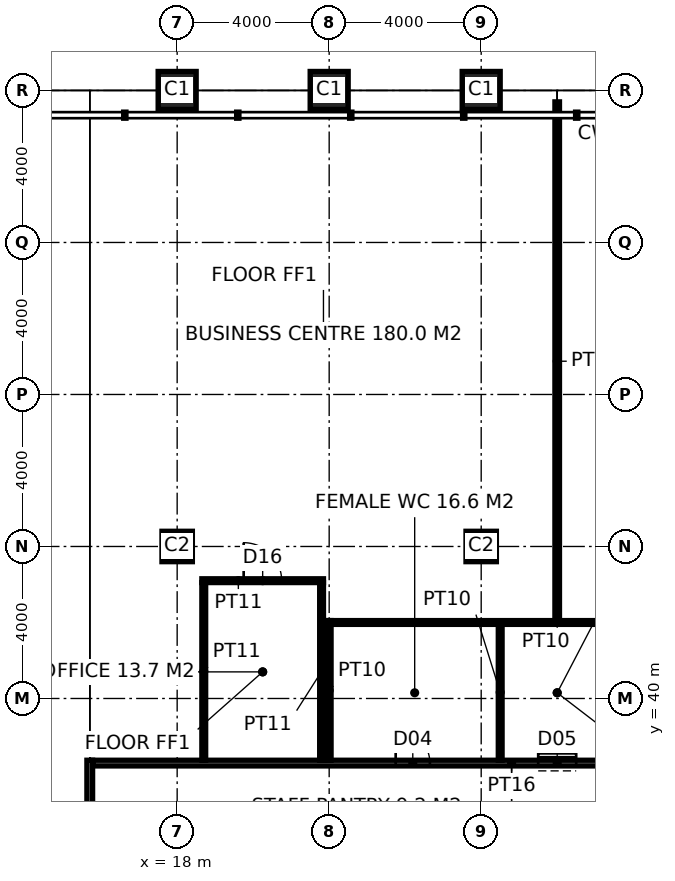
"""IFC4 building model, lengths in metres.
Left out: names, types, materials, properties, quantities, classifications, styles, units other than length and angle.
Written with IfcOpenShell. Run it as: python <this file> out.ifc"""

import sys

from ifc_helpers import new_model, si_unit, direction, frame, frame_2d, origin, origin_2d, place, context, subcontext, project, spatial, rectangle, hollow_rectangle, extrude, element, fill, save


model = new_model("IFC4")
c1 = context("Model", 3, precision=1e-05, world=origin(), true_north=direction((0.0, 1.0)))
c2 = subcontext(c1, "Body", "Model", "MODEL_VIEW")
j1 = project(units=[si_unit("LENGTHUNIT", "METRE"), si_unit("PLANEANGLEUNIT", "RADIAN")], contexts=[c1])
p1 = place(None, origin())
s1 = spatial("IfcSite", under=j1, at=p1, CompositionType="ELEMENT")
p2 = place(p1, origin())
s2 = spatial("IfcBuilding", under=s1, at=p2, CompositionType="ELEMENT")
p3 = place(p2, frame((0.0, 0.0, 209.2)))
s3 = spatial("IfcBuildingStorey", under=s2, at=p3, CompositionType="ELEMENT", Elevation=209.2)
for number, where, z_axis, x_axis in (
    (1, (18.0, 56.0, 0.0), (0.0, 0.0, 1.0), (1.0, 0.0, 0.0)),
    (2, (22.0, 56.0, 0.0), (0.0, 0.0, 1.0), (1.0, 0.0, 0.0)),
    (3, (26.0, 56.0, 0.0), (0.0, 0.0, 1.0), (1.0, 0.0, 0.0)),
):
    element("IfcColumn", number, at=place(p3, frame(where, z_axis=z_axis, x_axis=x_axis)), inside=s3, PredefinedType="COLUMN", context=c2, shape_type="SweptSolid", body=[
        extrude(hollow_rectangle(XDim=1.0, YDim=1.0, WallThickness=0.1, at=origin_2d()), origin(), (0.0, 0.0, 1.0), 5.0),
    ])
for number, where, z_axis, x_axis in (
    (4, (18.0, 44.0, 0.0), (0.0, 0.0, 1.0), (1.0, 0.0, 0.0)),
    (5, (26.0, 44.0, 0.0), (0.0, 0.0, 1.0), (1.0, 0.0, 0.0)),
):
    element("IfcColumn", number, at=place(p3, frame(where, z_axis=z_axis, x_axis=x_axis)), inside=s3, PredefinedType="COLUMN", context=c2, shape_type="SweptSolid", body=[
        extrude(hollow_rectangle(XDim=0.8, YDim=0.8, WallThickness=0.08, at=origin_2d()), origin(), (0.0, 0.0, 1.0), 5.0),
    ])
p4 = place(p3, frame((15.7, 15.025, 0.0), z_axis=(0.0, 0.0, 1.0), x_axis=(0.0, 1.0, 0.0)))
e6 = element("IfcWall", 6, at=p4, inside=s3, PredefinedType="PARTITIONING", context=c2, shape_type="SweptSolid", body=[
    extrude(rectangle(XDim=23.35, YDim=0.15, at=frame_2d((11.675, 0.0))), origin(), (0.0, 0.0, 1.0), 4.85),
])
p5 = place(p4, frame((10.875, 0.0, 0.0)))
e7 = element("IfcOpeningElement", 7, at=p5, cuts=e6, PredefinedType="OPENING", context=c2, shape_type="SweptSolid", body=[
    extrude(rectangle(XDim=1.6, YDim=2.7, at=frame_2d((0.8, 1.35))), frame((0.0, 0.085, 0.0), z_axis=(0.0, -1.0, 0.0), x_axis=(1.0, 0.0, 0.0)), (0.0, 0.0, 1.0), 0.17),
])
p6 = place(p3, frame((15.775, 38.3, 0.0), z_axis=(0.0, 0.0, 1.0), x_axis=(1.0, 0.0, 0.0)))
e8 = element("IfcWall", 8, at=p6, inside=s3, PredefinedType="PARTITIONING", context=c2, shape_type="SweptSolid", body=[
    extrude(rectangle(XDim=22.05, YDim=0.15, at=frame_2d((11.025, 0.0))), origin(), (0.0, 0.0, 1.0), 4.85),
])
p7 = place(p6, frame((7.975, 0.0, 0.0)))
e9 = element("IfcOpeningElement", 9, at=p7, cuts=e8, PredefinedType="OPENING", context=c2, shape_type="SweptSolid", body=[
    extrude(rectangle(XDim=0.9, YDim=2.1, at=frame_2d((0.45, 1.05))), frame((0.0, 0.085, 0.0), z_axis=(0.0, -1.0, 0.0), x_axis=(1.0, 0.0, 0.0)), (0.0, 0.0, 1.0), 0.17),
])
p8 = place(p6, frame((11.725, 0.0, 0.0)))
e10 = element("IfcOpeningElement", 10, at=p8, cuts=e8, PredefinedType="OPENING", context=c2, shape_type="SweptSolid", body=[
    extrude(rectangle(XDim=1.0, YDim=2.1, at=frame_2d((0.5, 1.05))), frame((0.0, 0.085, 0.0), z_axis=(0.0, -1.0, 0.0), x_axis=(1.0, 0.0, 0.0)), (0.0, 0.0, 1.0), 0.17),
])
p9 = place(p6, frame((15.575, 0.0, 0.0)))
e11 = element("IfcOpeningElement", 11, at=p9, cuts=e8, PredefinedType="OPENING", context=c2, shape_type="SweptSolid", body=[
    extrude(rectangle(XDim=0.9, YDim=2.1, at=frame_2d((0.45, 1.05))), frame((0.0, 0.085, 0.0), z_axis=(0.0, -1.0, 0.0), x_axis=(1.0, 0.0, 0.0)), (0.0, 0.0, 1.0), 0.17),
])
p10 = place(p3, frame((22.0, 38.375, 0.0), z_axis=(0.0, 0.0, 1.0), x_axis=(0.0, 1.0, 0.0)))
e12 = element("IfcWall", 12, at=p10, inside=s3, PredefinedType="PARTITIONING", context=c2, shape_type="SweptSolid", body=[
    extrude(rectangle(XDim=3.675, YDim=0.1, at=frame_2d((1.837, 0.0))), origin(), (0.0, 0.0, 1.0), 3.95),
])
p11 = place(p3, frame((21.95, 42.0, 0.0), z_axis=(0.0, 0.0, 1.0), x_axis=(1.0, 0.0, 0.0)))
e13 = element("IfcWall", 13, at=p11, inside=s3, PredefinedType="PARTITIONING", context=c2, shape_type="SweptSolid", body=[
    extrude(rectangle(XDim=12.1, YDim=0.1, at=frame_2d((6.05, 0.0))), origin(), (0.0, 0.0, 1.0), 4.85),
])
p12 = place(p3, frame((26.5, 38.375, 0.0), z_axis=(0.0, 0.0, 1.0), x_axis=(0.0, 1.0, 0.0)))
e14 = element("IfcWall", 14, at=p12, inside=s3, PredefinedType="PARTITIONING", context=c2, shape_type="SweptSolid", body=[
    extrude(rectangle(XDim=3.575, YDim=0.1, at=frame_2d((1.788, 0.0))), origin(), (0.0, 0.0, 1.0), 4.85),
])
p13 = place(p3, frame((28.0, 42.05, 0.0), z_axis=(0.0, 0.0, 1.0), x_axis=(0.0, 1.0, 0.0)))
e15 = element("IfcWall", 15, at=p13, inside=s3, PredefinedType="PARTITIONING", context=c2, shape_type="SweptSolid", body=[
    extrude(rectangle(XDim=13.65, YDim=0.12, at=frame_2d((6.825, 0.0))), origin(), (0.0, 0.0, 1.0), 4.85),
])
p14 = place(p3, frame((18.65, 43.1, 0.0), z_axis=(0.0, 0.0, 1.0), x_axis=(1.0, 0.0, 0.0)))
e16 = element("IfcWall", 16, at=p14, inside=s3, PredefinedType="PARTITIONING", context=c2, shape_type="SweptSolid", body=[
    extrude(rectangle(XDim=3.2, YDim=0.1, at=frame_2d((1.6, 0.0))), origin(), (0.0, 0.0, 1.0), 4.85),
])
p15 = place(p14, frame((1.1, 0.0, 0.0)))
e17 = element("IfcOpeningElement", 17, at=p15, cuts=e16, PredefinedType="OPENING", context=c2, shape_type="SweptSolid", body=[
    extrude(rectangle(XDim=1.0, YDim=2.2, at=frame_2d((0.5, 1.1))), frame((0.0, 0.06, 0.0), z_axis=(0.0, -1.0, 0.0), x_axis=(1.0, 0.0, 0.0)), (0.0, 0.0, 1.0), 0.12),
])
p16 = place(p3, frame((18.7, 38.375, 0.0), z_axis=(0.0, 0.0, 1.0), x_axis=(0.0, 1.0, 0.0)))
e18 = element("IfcWall", 18, at=p16, inside=s3, PredefinedType="PARTITIONING", context=c2, shape_type="SweptSolid", body=[
    extrude(rectangle(XDim=4.675, YDim=0.1, at=frame_2d((2.337, 0.0))), origin(), (0.0, 0.0, 1.0), 4.85),
])
p17 = place(p3, frame((21.8, 38.375, 0.0), z_axis=(0.0, 0.0, 1.0), x_axis=(0.0, 1.0, 0.0)))
e19 = element("IfcWall", 19, at=p17, inside=s3, PredefinedType="PARTITIONING", context=c2, shape_type="SweptSolid", body=[
    extrude(rectangle(XDim=4.675, YDim=0.1, at=frame_2d((2.337, 0.0))), origin(), (0.0, 0.0, 1.0), 3.95),
])
p18 = place(p7, origin())
e20 = element("IfcDoor", 20, at=p18, inside=s3, OperationType="SINGLE_SWING_LEFT", PredefinedType="DOOR", context=c2, shape_type="SweptSolid", body=[
    extrude(rectangle(XDim=0.9, YDim=2.1, at=frame_2d((0.45, 1.05))), frame((0.0, 0.025, 0.0), z_axis=(0.0, -1.0, 0.0), x_axis=(1.0, 0.0, 0.0)), (0.0, 0.0, 1.0), 0.05),
])
fill(e9, e20)
p19 = place(p8, origin())
e21 = element("IfcDoor", 21, at=p19, inside=s3, OperationType="SLIDING_TO_LEFT", PredefinedType="DOOR", context=c2, shape_type="SweptSolid", body=[
    extrude(rectangle(XDim=1.0, YDim=2.1, at=frame_2d((0.5, 1.05))), frame((0.0, 0.025, 0.0), z_axis=(0.0, -1.0, 0.0), x_axis=(1.0, 0.0, 0.0)), (0.0, 0.0, 1.0), 0.05),
])
fill(e10, e21)
p20 = place(p15, origin())
e22 = element("IfcDoor", 22, at=p20, inside=s3, OperationType="SINGLE_SWING_LEFT", PredefinedType="DOOR", context=c2, shape_type="SweptSolid", body=[
    extrude(rectangle(XDim=1.0, YDim=2.2, at=frame_2d((0.5, 1.1))), frame((0.0, 0.025, 0.0), z_axis=(0.0, -1.0, 0.0), x_axis=(1.0, 0.0, 0.0)), (0.0, 0.0, 1.0), 0.05),
])
fill(e17, e22)
save(model, sys.argv[1])
